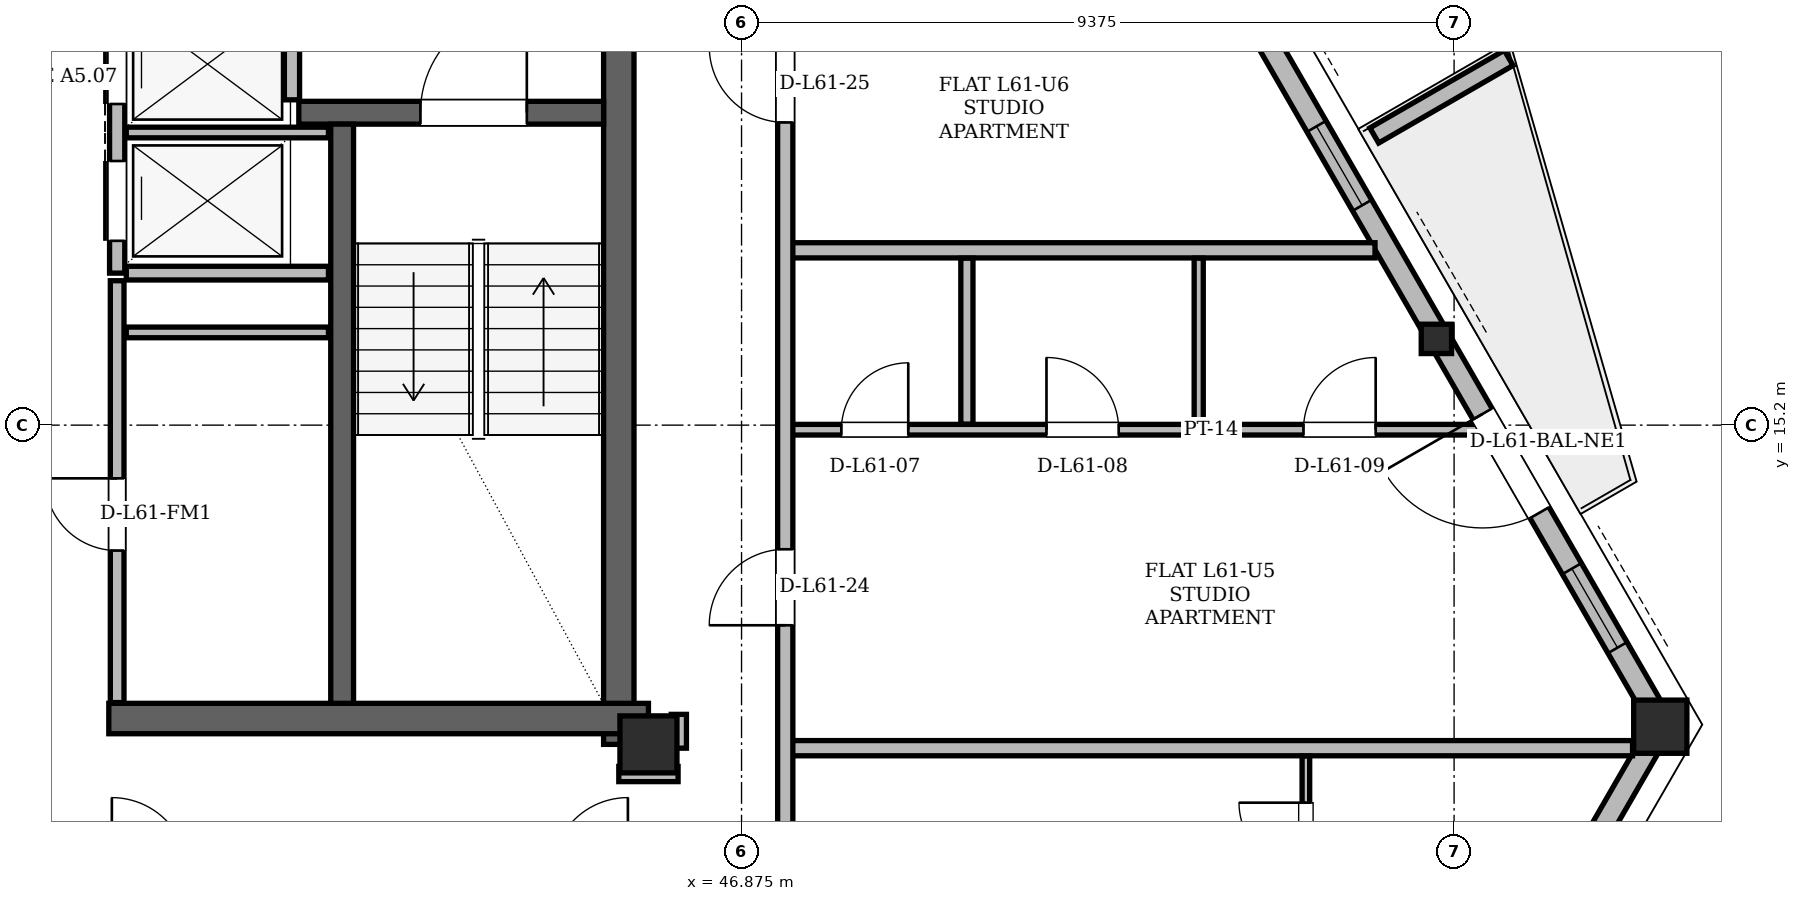
"""IFC4 building model, lengths in metres.
Left out: names, types, materials, properties, quantities, classifications, styles, units other than length and angle.
Written with IfcOpenShell. Run it as: python <this file> out.ifc"""

import sys

from ifc_helpers import new_model, si_unit, direction, frame, frame_2d, origin, origin_2d, place, context, subcontext, project, spatial, polyline, rectangle, hollow_rectangle, i_section, outline, extrude, element, fill, save


model = new_model("IFC4")
c1 = context("Model", 3, precision=1e-05, world=origin(), true_north=direction((0.0, 1.0)))
c2 = subcontext(c1, "Body", "Model", "MODEL_VIEW")
j1 = project(units=[si_unit("LENGTHUNIT", "METRE"), si_unit("PLANEANGLEUNIT", "RADIAN")], contexts=[c1])
p1 = place(None, origin())
s1 = spatial("IfcSite", under=j1, at=p1, CompositionType="ELEMENT")
p2 = place(p1, origin())
s2 = spatial("IfcBuilding", under=s1, at=p2, CompositionType="ELEMENT")
p3 = place(p2, frame((0.0, 0.0, 230.7)))
s3 = spatial("IfcBuildingStorey", under=s2, at=p3, CompositionType="ELEMENT", Elevation=230.7)
p4 = place(p3, frame((45.65, 11.0, 0.0), z_axis=(0.0, 0.0, 1.0), x_axis=(1.0, 0.0, 0.0)))
e1 = element("IfcColumn", 1, at=p4, inside=s3, PredefinedType="COLUMN", context=c2, shape_type="SweptSolid", body=[
    extrude(hollow_rectangle(XDim=0.75, YDim=0.75, WallThickness=0.06, at=origin_2d()), origin(), (0.0, 0.0, 1.0), 3.6),
])
p5 = place(p3, frame((58.984, 11.26, 0.005), z_axis=(-0.011828072594, -0.015362898887, 0.99981202135), x_axis=(0.792363245136, -0.610049578114, 0.0)))
e2 = element("IfcColumn", 2, at=p5, inside=s3, PredefinedType="COLUMN", context=c2, shape_type="SweptSolid", body=[
    extrude(hollow_rectangle(XDim=0.7, YDim=0.7, WallThickness=0.055, at=origin_2d()), origin(), (0.0, 0.0, 1.0), 3.592),
])
p6 = place(p3, frame((56.041, 16.359, 0.005), z_axis=(-0.012983894256, -0.013255808272, 0.999827836198), x_axis=(0.714395955768, -0.699741679752, 0.0)))
e3 = element("IfcColumn", 3, at=p6, inside=s3, PredefinedType="COLUMN", context=c2, shape_type="SweptSolid", body=[
    extrude(i_section(OverallWidth=0.399, OverallDepth=0.386, WebThickness=0.021, FlangeThickness=0.033, at=origin_2d()), origin(), (0.0, 0.0, 1.0), 3.592),
])
p7 = place(p3, frame((45.26, 11.0, 0.0), z_axis=(0.0, 0.0, 1.0), x_axis=(0.0, 1.0, 0.0)))
e4 = element("IfcWall", 4, at=p7, inside=s3, PredefinedType="SHEAR", context=c2, shape_type="SweptSolid", body=[
    extrude(rectangle(XDim=13.3, YDim=0.4, at=frame_2d((6.65, 0.0))), origin(), (0.0, 0.0, 1.0), 3.38),
])
p8 = place(p3, frame((38.55, 11.34, 0.0), z_axis=(0.0, 0.0, 1.0), x_axis=(1.0, 0.0, 0.0)))
e5 = element("IfcWall", 5, at=p8, inside=s3, PredefinedType="SHEAR", context=c2, shape_type="SweptSolid", body=[
    extrude(rectangle(XDim=7.1, YDim=0.4, at=frame_2d((3.55, 0.0))), origin(), (0.0, 0.0, 1.0), 3.38),
])
p9 = place(p3, frame((41.05, 19.31, 0.0), z_axis=(0.0, 0.0, 1.0), x_axis=(1.0, 0.0, 0.0)))
e6 = element("IfcWall", 6, at=p9, inside=s3, PredefinedType="SHEAR", context=c2, shape_type="SweptSolid", body=[
    extrude(rectangle(XDim=4.01, YDim=0.3, at=frame_2d((2.005, 0.0))), origin(), (0.0, 0.0, 1.0), 3.38),
])
p10 = place(p9, frame((1.6, 0.0, 0.0)))
e7 = element("IfcOpeningElement", 7, at=p10, cuts=e6, PredefinedType="OPENING", context=c2, shape_type="SweptSolid", body=[
    extrude(rectangle(XDim=1.4, YDim=2.2, at=frame_2d((0.7, 1.1))), frame((0.0, 0.15, 0.0), z_axis=(0.0, -1.0, 0.0), x_axis=(1.0, 0.0, 0.0)), (0.0, 0.0, 1.0), 0.3),
])
p11 = place(p3, frame((41.62, 11.54, 0.0), z_axis=(0.0, 0.0, 1.0), x_axis=(0.0, 1.0, 0.0)))
e8 = element("IfcWall", 8, at=p11, inside=s3, PredefinedType="SHEAR", context=c2, shape_type="SweptSolid", body=[
    extrude(rectangle(XDim=7.62, YDim=0.3, at=frame_2d((3.81, 0.0))), origin(), (0.0, 0.0, 1.0), 3.38),
])
p12 = place(p3, frame((55.898, 5.914, 0.0), z_axis=(0.0, 0.0, 1.0), x_axis=(0.49997579017, 0.866039380885, 0.0)))
e9 = element("IfcWall", 9, at=p12, inside=s3, PredefinedType="SOLIDWALL", context=c2, shape_type="SweptSolid", body=[
    extrude(rectangle(XDim=6.173, YDim=0.29, at=frame_2d((3.086, 0.0))), origin(), (0.0, 0.0, 1.0), 2.677),
])
p13 = place(p3, frame((58.984, 11.26, 0.0), z_axis=(0.0, 0.0, 1.0), x_axis=(-0.50000331183, 0.86602349169, 0.0)))
e10 = element("IfcWall", 10, at=p13, inside=s3, PredefinedType="SOLIDWALL", context=c2, shape_type="SweptSolid", body=[
    extrude(rectangle(XDim=36.795, YDim=0.29, at=frame_2d((18.397, 0.0))), origin(), (0.0, 0.0, 1.0), 2.677),
])
p14 = place(p13, frame((3.219, 0.0, 0.0)))
e11 = element("IfcOpeningElement", 11, at=p14, cuts=e10, PredefinedType="OPENING", context=c2, shape_type="SweptSolid", body=[
    extrude(rectangle(XDim=1.5, YDim=2.2, at=frame_2d((0.75, 1.1))), frame((0.0, 0.145, 0.0), z_axis=(0.0, -1.0, 0.0), x_axis=(1.0, 0.0, 0.0)), (0.0, 0.0, 1.0), 0.29),
])
p15 = place(p13, frame((27.151, 0.0, 0.0)))
e12 = element("IfcOpeningElement", 12, at=p15, cuts=e10, PredefinedType="OPENING", context=c2, shape_type="SweptSolid", body=[
    extrude(rectangle(XDim=1.3, YDim=2.2, at=frame_2d((0.65, 1.1))), frame((0.0, 0.145, 0.0), z_axis=(0.0, -1.0, 0.0), x_axis=(1.0, 0.0, 0.0)), (0.0, 0.0, 1.0), 0.29),
])
p16 = place(p13, frame((1.169, 0.0, 0.85)))
e13 = element("IfcOpeningElement", 13, at=p16, cuts=e10, PredefinedType="OPENING", context=c2, shape_type="SweptSolid", body=[
    extrude(rectangle(XDim=1.2, YDim=1.48, at=frame_2d((0.6, 0.74))), frame((0.0, 0.145, 0.0), z_axis=(0.0, -1.0, 0.0), x_axis=(1.0, 0.0, 0.0)), (0.0, 0.0, 1.0), 0.29),
])
p17 = place(p13, frame((7.888, 0.0, 0.85)))
e14 = element("IfcOpeningElement", 14, at=p17, cuts=e10, PredefinedType="OPENING", context=c2, shape_type="SweptSolid", body=[
    extrude(rectangle(XDim=1.2, YDim=1.48, at=frame_2d((0.6, 0.74))), frame((0.0, 0.145, 0.0), z_axis=(0.0, -1.0, 0.0), x_axis=(1.0, 0.0, 0.0)), (0.0, 0.0, 1.0), 0.29),
])
p18 = place(p13, frame((32.464, 0.0, 0.85)))
e15 = element("IfcOpeningElement", 15, at=p18, cuts=e10, PredefinedType="OPENING", context=c2, shape_type="SweptSolid", body=[
    extrude(rectangle(XDim=1.2, YDim=1.48, at=frame_2d((0.6, 0.74))), frame((0.0, 0.145, 0.0), z_axis=(0.0, -1.0, 0.0), x_axis=(1.0, 0.0, 0.0)), (0.0, 0.0, 1.0), 0.29),
])
p19 = place(p13, frame((16.904, 0.0, 0.85)))
e16 = element("IfcOpeningElement", 16, at=p19, cuts=e10, PredefinedType="OPENING", context=c2, shape_type="SweptSolid", body=[
    extrude(rectangle(XDim=2.0, YDim=1.717, at=frame_2d((1.0, 0.858))), frame((0.0, 0.145, 0.0), z_axis=(0.0, -1.0, 0.0), x_axis=(1.0, 0.0, 0.0)), (0.0, 0.0, 1.0), 0.29),
])
p20 = place(p13, frame((23.036, 0.0, 0.85)))
e17 = element("IfcOpeningElement", 17, at=p20, cuts=e10, PredefinedType="OPENING", context=c2, shape_type="SweptSolid", body=[
    extrude(rectangle(XDim=1.4, YDim=1.6, at=frame_2d((0.7, 0.8))), frame((0.0, 0.145, 0.0), z_axis=(0.0, -1.0, 0.0), x_axis=(1.0, 0.0, 0.0)), (0.0, 0.0, 1.0), 0.29),
])
p21 = place(p3, frame((55.2, 19.011, 0.0), z_axis=(0.0, 0.0, 1.0), x_axis=(0.866042246008, 0.499970827278, 0.0)))
e18 = element("IfcWall", 18, at=p21, inside=s3, PredefinedType="PARAPET", context=c2, shape_type="SweptSolid", body=[
    extrude(outline(polyline([(0.0, 0.0), (2.042, 0.0), (2.042, 1.1), (0.0, 1.32), (0.0, 0.0)])), frame((0.0, 0.115, 0.0), z_axis=(0.0, -1.0, 0.0), x_axis=(1.0, 0.0, 0.0)), (0.0, 0.0, 1.0), 0.23),
])
p22 = place(p3, frame((40.96, 19.48, 0.0), z_axis=(0.0, 0.0, 1.0), x_axis=(0.0, 1.0, 0.0)))
e19 = element("IfcWall", 19, at=p22, inside=s3, PredefinedType="PARTITIONING", context=c2, shape_type="SweptSolid", body=[
    extrude(rectangle(XDim=4.5, YDim=0.2, at=frame_2d((2.25, 0.0))), origin(), (0.0, 0.0, 1.0), 3.38),
])
p23 = place(p22, frame((2.12, 0.0, 0.0)))
e20 = element("IfcOpeningElement", 20, at=p23, cuts=e19, PredefinedType="OPENING", context=c2, shape_type="SweptSolid", body=[
    extrude(rectangle(XDim=1.1, YDim=2.2, at=frame_2d((0.55, 1.1))), frame((0.0, 0.1, 0.0), z_axis=(0.0, -1.0, 0.0), x_axis=(1.0, 0.0, 0.0)), (0.0, 0.0, 1.0), 0.2),
])
p24 = place(p3, frame((38.66, 17.2, 0.0), z_axis=(0.0, 0.0, 1.0), x_axis=(0.0, 1.0, 0.0)))
e21 = element("IfcWall", 21, at=p24, inside=s3, PredefinedType="PARTITIONING", context=c2, shape_type="SweptSolid", body=[
    extrude(rectangle(XDim=3.62, YDim=0.2, at=frame_2d((1.81, 0.0))), origin(), (0.0, 0.0, 1.0), 3.38),
])
p25 = place(p24, frame((0.425, 0.0, 0.0)))
e22 = element("IfcOpeningElement", 22, at=p25, cuts=e21, PredefinedType="OPENING", context=c2, shape_type="SweptSolid", body=[
    extrude(rectangle(XDim=1.05, YDim=2.15, at=frame_2d((0.525, 1.075))), frame((0.0, 0.1, 0.0), z_axis=(0.0, -1.0, 0.0), x_axis=(1.0, 0.0, 0.0)), (0.0, 0.0, 1.0), 0.2),
])
p26 = place(p24, frame((2.225, 0.0, 0.0)))
e23 = element("IfcOpeningElement", 23, at=p26, cuts=e21, PredefinedType="OPENING", context=c2, shape_type="SweptSolid", body=[
    extrude(rectangle(XDim=1.05, YDim=2.15, at=frame_2d((0.525, 1.075))), frame((0.0, 0.1, 0.0), z_axis=(0.0, -1.0, 0.0), x_axis=(1.0, 0.0, 0.0)), (0.0, 0.0, 1.0), 0.2),
])
p27 = place(p3, frame((38.78, 17.2, 0.0), z_axis=(0.0, 0.0, 1.0), x_axis=(1.0, 0.0, 0.0)))
e24 = element("IfcWall", 24, at=p27, inside=s3, PredefinedType="PARTITIONING", context=c2, shape_type="SweptSolid", body=[
    extrude(rectangle(XDim=2.66, YDim=0.18, at=frame_2d((1.33, 0.0))), origin(), (0.0, 0.0, 1.0), 3.38),
])
p28 = place(p3, frame((38.78, 19.05, 0.0), z_axis=(0.0, 0.0, 1.0), x_axis=(1.0, 0.0, 0.0)))
e25 = element("IfcWall", 25, at=p28, inside=s3, PredefinedType="PARTITIONING", context=c2, shape_type="SweptSolid", body=[
    extrude(rectangle(XDim=2.66, YDim=0.14, at=frame_2d((1.33, 0.0))), origin(), (0.0, 0.0, 1.0), 3.38),
])
p29 = place(p3, frame((38.66, 11.55, 0.0), z_axis=(0.0, 0.0, 1.0), x_axis=(0.0, 1.0, 0.0)))
e26 = element("IfcWall", 26, at=p29, inside=s3, PredefinedType="PARTITIONING", context=c2, shape_type="SweptSolid", body=[
    extrude(rectangle(XDim=5.55, YDim=0.18, at=frame_2d((2.775, 0.0))), origin(), (0.0, 0.0, 1.0), 3.38),
])
p30 = place(p29, frame((2.0, 0.0, 0.0)))
e27 = element("IfcOpeningElement", 27, at=p30, cuts=e26, PredefinedType="OPENING", context=c2, shape_type="SweptSolid", body=[
    extrude(rectangle(XDim=0.95, YDim=2.1, at=frame_2d((0.475, 1.05))), frame((0.0, 0.09, 0.0), z_axis=(0.0, -1.0, 0.0), x_axis=(1.0, 0.0, 0.0)), (0.0, 0.0, 1.0), 0.18),
])
p31 = place(p3, frame((38.78, 16.42, 0.0), z_axis=(0.0, 0.0, 1.0), x_axis=(1.0, 0.0, 0.0)))
e28 = element("IfcWall", 28, at=p31, inside=s3, PredefinedType="PARTITIONING", context=c2, shape_type="SweptSolid", body=[
    extrude(rectangle(XDim=2.66, YDim=0.14, at=frame_2d((1.33, 0.0))), origin(), (0.0, 0.0, 1.0), 3.38),
])
p32 = place(p3, frame((45.26, 10.61, 0.0), z_axis=(0.0, 0.0, 1.0), x_axis=(1.0, 0.0, 0.0)))
e29 = element("IfcWall", 29, at=p32, inside=s3, PredefinedType="PARTITIONING", context=c2, shape_type="SweptSolid", body=[
    extrude(rectangle(XDim=0.78, YDim=0.2, at=frame_2d((0.39, 0.0))), origin(), (0.0, 0.0, 1.0), 3.38),
])
p33 = place(p3, frame((47.45, 10.95, 0.0), z_axis=(0.0, 0.0, 1.0), x_axis=(1.0, 0.0, 0.0)))
e30 = element("IfcWall", 30, at=p33, inside=s3, PredefinedType="PARTITIONING", context=c2, shape_type="SweptSolid", body=[
    extrude(rectangle(XDim=11.148, YDim=0.2, at=frame_2d((5.574, 0.0))), origin(), (0.0, 0.0, 1.0), 2.913),
])
p34 = place(p3, frame((47.4, 15.14, 0.0), z_axis=(0.0, 0.0, 1.0), x_axis=(1.0, 0.0, 0.0)))
e31 = element("IfcWall", 31, at=p34, inside=s3, PredefinedType="PARTITIONING", context=c2, shape_type="SweptSolid", body=[
    extrude(rectangle(XDim=9.172, YDim=0.14, at=frame_2d((4.586, 0.0))), origin(), (0.0, 0.0, 1.0), 3.38),
])
p35 = place(p34, frame((0.789, 0.0, 0.0)))
e32 = element("IfcOpeningElement", 32, at=p35, cuts=e31, PredefinedType="OPENING", context=c2, shape_type="SweptSolid", body=[
    extrude(rectangle(XDim=0.88, YDim=2.08, at=frame_2d((0.44, 1.04))), frame((0.0, 0.07, 0.0), z_axis=(0.0, -1.0, 0.0), x_axis=(1.0, 0.0, 0.0)), (0.0, 0.0, 1.0), 0.14),
])
p36 = place(p34, frame((3.487, 0.0, 0.0)))
e33 = element("IfcOpeningElement", 33, at=p36, cuts=e31, PredefinedType="OPENING", context=c2, shape_type="SweptSolid", body=[
    extrude(rectangle(XDim=0.95, YDim=2.1, at=frame_2d((0.475, 1.05))), frame((0.0, 0.07, 0.0), z_axis=(0.0, -1.0, 0.0), x_axis=(1.0, 0.0, 0.0)), (0.0, 0.0, 1.0), 0.14),
])
p37 = place(p34, frame((6.868, 0.0, 0.0)))
e34 = element("IfcOpeningElement", 34, at=p37, cuts=e31, PredefinedType="OPENING", context=c2, shape_type="SweptSolid", body=[
    extrude(rectangle(XDim=0.95, YDim=2.1, at=frame_2d((0.475, 1.05))), frame((0.0, 0.07, 0.0), z_axis=(0.0, -1.0, 0.0), x_axis=(1.0, 0.0, 0.0)), (0.0, 0.0, 1.0), 0.14),
])
p38 = place(p3, frame((47.45, 17.5, 0.0), z_axis=(0.0, 0.0, 1.0), x_axis=(1.0, 0.0, 0.0)))
e35 = element("IfcWall", 35, at=p38, inside=s3, PredefinedType="PARTITIONING", context=c2, shape_type="SweptSolid", body=[
    extrude(rectangle(XDim=7.76, YDim=0.2, at=frame_2d((3.88, 0.0))), origin(), (0.0, 0.0, 1.0), 3.38),
])
p39 = place(p3, frame((46.05, 10.95, 0.0), z_axis=(0.0, 0.0, 1.0), x_axis=(0.0, 1.0, 0.0)))
e36 = element("IfcWall", 36, at=p39, inside=s3, PredefinedType="PARTITIONING", context=c2, shape_type="SweptSolid", body=[
    extrude(rectangle(XDim=0.445, YDim=0.2, at=frame_2d((0.223, 0.0))), origin(), (0.0, 0.0, 1.0), 2.913),
])
p40 = place(p3, frame((47.45, 9.404, 0.0), z_axis=(0.0, 0.0, 1.0), x_axis=(0.0, 1.0, 0.0)))
e37 = element("IfcWall", 37, at=p40, inside=s3, PredefinedType="PARTITIONING", context=c2, shape_type="SweptSolid", body=[
    extrude(rectangle(XDim=16.462, YDim=0.2, at=frame_2d((8.231, 0.0))), origin(), (0.0, 0.0, 1.0), 2.913),
])
p41 = place(p40, frame((3.163, 0.0, 0.0)))
e38 = element("IfcOpeningElement", 38, at=p41, cuts=e37, PredefinedType="OPENING", context=c2, shape_type="SweptSolid", body=[
    extrude(rectangle(XDim=1.0, YDim=2.18, at=frame_2d((0.5, 1.09))), frame((0.0, 0.1, 0.0), z_axis=(0.0, -1.0, 0.0), x_axis=(1.0, 0.0, 0.0)), (0.0, 0.0, 1.0), 0.2),
])
p42 = place(p40, frame((9.778, 0.0, 0.0)))
e39 = element("IfcOpeningElement", 39, at=p42, cuts=e37, PredefinedType="OPENING", context=c2, shape_type="SweptSolid", body=[
    extrude(rectangle(XDim=1.0, YDim=2.18, at=frame_2d((0.5, 1.09))), frame((0.0, 0.1, 0.0), z_axis=(0.0, -1.0, 0.0), x_axis=(1.0, 0.0, 0.0)), (0.0, 0.0, 1.0), 0.2),
])
p43 = place(p3, frame((49.84, 15.214, 0.0), z_axis=(0.0, 0.0, 1.0), x_axis=(0.0, 1.0, 0.0)))
e40 = element("IfcWall", 40, at=p43, inside=s3, PredefinedType="PARTITIONING", context=c2, shape_type="SweptSolid", body=[
    extrude(rectangle(XDim=2.182, YDim=0.16, at=frame_2d((1.091, 0.0))), origin(), (0.0, 0.0, 1.0), 3.38),
])
p44 = place(p3, frame((52.89, 15.214, 0.0), z_axis=(0.0, 0.0, 1.0), x_axis=(0.0, 1.0, 0.0)))
e41 = element("IfcWall", 41, at=p44, inside=s3, PredefinedType="PARTITIONING", context=c2, shape_type="SweptSolid", body=[
    extrude(rectangle(XDim=2.182, YDim=0.12, at=frame_2d((1.091, 0.0))), origin(), (0.0, 0.0, 1.0), 3.38),
])
p45 = place(p3, frame((54.3, 6.063, 0.0), z_axis=(0.0, 0.0, 1.0), x_axis=(0.0, 1.0, 0.0)))
e42 = element("IfcWall", 42, at=p45, inside=s3, PredefinedType="PARTITIONING", context=c2, shape_type="SweptSolid", body=[
    extrude(rectangle(XDim=4.783, YDim=0.1, at=frame_2d((2.392, 0.0))), origin(), (0.0, 0.0, 1.0), 2.913),
])
p46 = place(p45, frame((0.782, 0.0, 0.0)))
e43 = element("IfcOpeningElement", 43, at=p46, cuts=e42, PredefinedType="OPENING", context=c2, shape_type="SweptSolid", body=[
    extrude(rectangle(XDim=0.95, YDim=2.1, at=frame_2d((0.475, 1.05))), frame((0.0, 0.05, 0.0), z_axis=(0.0, -1.0, 0.0), x_axis=(1.0, 0.0, 0.0)), (0.0, 0.0, 1.0), 0.1),
])
p47 = place(p45, frame((3.29, 0.0, 0.0)))
e44 = element("IfcOpeningElement", 44, at=p47, cuts=e42, PredefinedType="OPENING", context=c2, shape_type="SweptSolid", body=[
    extrude(rectangle(XDim=0.88, YDim=2.08, at=frame_2d((0.44, 1.04))), frame((0.0, 0.05, 0.0), z_axis=(0.0, -1.0, 0.0), x_axis=(1.0, 0.0, 0.0)), (0.0, 0.0, 1.0), 0.1),
])
p48 = place(p14, origin())
e45 = element("IfcDoor", 45, at=p48, inside=s3, OperationType="SINGLE_SWING_RIGHT", PredefinedType="DOOR", context=c2, shape_type="SweptSolid", body=[
    extrude(rectangle(XDim=1.5, YDim=2.2, at=frame_2d((0.75, 1.1))), frame((0.0, 0.025, 0.0), z_axis=(0.0, -1.0, 0.0), x_axis=(1.0, 0.0, 0.0)), (0.0, 0.0, 1.0), 0.05),
])
fill(e11, e45)
p49 = place(p16, origin())
e46 = element("IfcWindow", 46, at=p49, inside=s3, PartitioningType="SINGLE_PANEL", PredefinedType="WINDOW", context=c2, shape_type="SweptSolid", body=[
    extrude(rectangle(XDim=1.2, YDim=1.48, at=frame_2d((0.6, 0.74))), frame((0.0, 0.03, 0.0), z_axis=(0.0, -1.0, 0.0), x_axis=(1.0, 0.0, 0.0)), (0.0, 0.0, 1.0), 0.06),
])
fill(e13, e46)
p50 = place(p17, origin())
e47 = element("IfcWindow", 47, at=p50, inside=s3, PartitioningType="SINGLE_PANEL", PredefinedType="WINDOW", context=c2, shape_type="SweptSolid", body=[
    extrude(rectangle(XDim=1.2, YDim=1.48, at=frame_2d((0.6, 0.74))), frame((0.0, 0.03, 0.0), z_axis=(0.0, -1.0, 0.0), x_axis=(1.0, 0.0, 0.0)), (0.0, 0.0, 1.0), 0.06),
])
fill(e14, e47)
p51 = place(p30, origin())
e48 = element("IfcDoor", 48, at=p51, inside=s3, OperationType="SINGLE_SWING_RIGHT", PredefinedType="DOOR", context=c2, shape_type="SweptSolid", body=[
    extrude(rectangle(XDim=0.95, YDim=2.1, at=frame_2d((0.475, 1.05))), frame((0.0, 0.025, 0.0), z_axis=(0.0, -1.0, 0.0), x_axis=(1.0, 0.0, 0.0)), (0.0, 0.0, 1.0), 0.05),
])
fill(e27, e48)
p52 = place(p25, origin())
e49 = element("IfcDoor", 49, at=p52, inside=s3, OperationType="SLIDING_TO_RIGHT", PredefinedType="DOOR", context=c2, shape_type="SweptSolid", body=[
    extrude(rectangle(XDim=1.05, YDim=2.15, at=frame_2d((0.525, 1.075))), frame((0.0, 0.025, 0.0), z_axis=(0.0, -1.0, 0.0), x_axis=(1.0, 0.0, 0.0)), (0.0, 0.0, 1.0), 0.05),
])
fill(e22, e49)
p53 = place(p26, origin())
e50 = element("IfcDoor", 50, at=p53, inside=s3, OperationType="SLIDING_TO_LEFT", PredefinedType="DOOR", context=c2, shape_type="SweptSolid", body=[
    extrude(rectangle(XDim=1.05, YDim=2.15, at=frame_2d((0.525, 1.075))), frame((0.0, 0.025, 0.0), z_axis=(0.0, -1.0, 0.0), x_axis=(1.0, 0.0, 0.0)), (0.0, 0.0, 1.0), 0.05),
])
fill(e23, e50)
p54 = place(p10, origin())
e51 = element("IfcDoor", 51, at=p54, inside=s3, OperationType="SINGLE_SWING_RIGHT", PredefinedType="DOOR", context=c2, shape_type="SweptSolid", body=[
    extrude(rectangle(XDim=1.4, YDim=2.2, at=frame_2d((0.7, 1.1))), frame((0.0, 0.025, 0.0), z_axis=(0.0, -1.0, 0.0), x_axis=(1.0, 0.0, 0.0)), (0.0, 0.0, 1.0), 0.05),
])
fill(e7, e51)
p55 = place(p35, origin())
e52 = element("IfcDoor", 52, at=p55, inside=s3, OperationType="SINGLE_SWING_RIGHT", PredefinedType="DOOR", context=c2, shape_type="SweptSolid", body=[
    extrude(rectangle(XDim=0.88, YDim=2.08, at=frame_2d((0.44, 1.04))), frame((0.0, 0.025, 0.0), z_axis=(0.0, -1.0, 0.0), x_axis=(1.0, 0.0, 0.0)), (0.0, 0.0, 1.0), 0.05),
])
fill(e32, e52)
p56 = place(p36, origin())
e53 = element("IfcDoor", 53, at=p56, inside=s3, OperationType="SINGLE_SWING_LEFT", PredefinedType="DOOR", context=c2, shape_type="SweptSolid", body=[
    extrude(rectangle(XDim=0.95, YDim=2.1, at=frame_2d((0.475, 1.05))), frame((0.0, 0.025, 0.0), z_axis=(0.0, -1.0, 0.0), x_axis=(1.0, 0.0, 0.0)), (0.0, 0.0, 1.0), 0.05),
])
fill(e33, e53)
p57 = place(p37, origin())
e54 = element("IfcDoor", 54, at=p57, inside=s3, OperationType="SINGLE_SWING_RIGHT", PredefinedType="DOOR", context=c2, shape_type="SweptSolid", body=[
    extrude(rectangle(XDim=0.95, YDim=2.1, at=frame_2d((0.475, 1.05))), frame((0.0, 0.025, 0.0), z_axis=(0.0, -1.0, 0.0), x_axis=(1.0, 0.0, 0.0)), (0.0, 0.0, 1.0), 0.05),
])
fill(e34, e54)
p58 = place(p41, origin())
e55 = element("IfcDoor", 55, at=p58, inside=s3, OperationType="SINGLE_SWING_LEFT", PredefinedType="DOOR", context=c2, shape_type="SweptSolid", body=[
    extrude(rectangle(XDim=1.0, YDim=2.18, at=frame_2d((0.5, 1.09))), frame((0.0, 0.025, 0.0), z_axis=(0.0, -1.0, 0.0), x_axis=(1.0, 0.0, 0.0)), (0.0, 0.0, 1.0), 0.05),
])
fill(e38, e55)
p59 = place(p42, origin())
e56 = element("IfcDoor", 56, at=p59, inside=s3, OperationType="SINGLE_SWING_RIGHT", PredefinedType="DOOR", context=c2, shape_type="SweptSolid", body=[
    extrude(rectangle(XDim=1.0, YDim=2.18, at=frame_2d((0.5, 1.09))), frame((0.0, 0.025, 0.0), z_axis=(0.0, -1.0, 0.0), x_axis=(1.0, 0.0, 0.0)), (0.0, 0.0, 1.0), 0.05),
])
fill(e39, e56)
p60 = place(p47, origin())
e57 = element("IfcDoor", 57, at=p60, inside=s3, OperationType="SINGLE_SWING_RIGHT", PredefinedType="DOOR", context=c2, shape_type="SweptSolid", body=[
    extrude(rectangle(XDim=0.88, YDim=2.08, at=frame_2d((0.44, 1.04))), frame((0.0, 0.025, 0.0), z_axis=(0.0, -1.0, 0.0), x_axis=(1.0, 0.0, 0.0)), (0.0, 0.0, 1.0), 0.05),
])
fill(e44, e57)
save(model, sys.argv[1])
